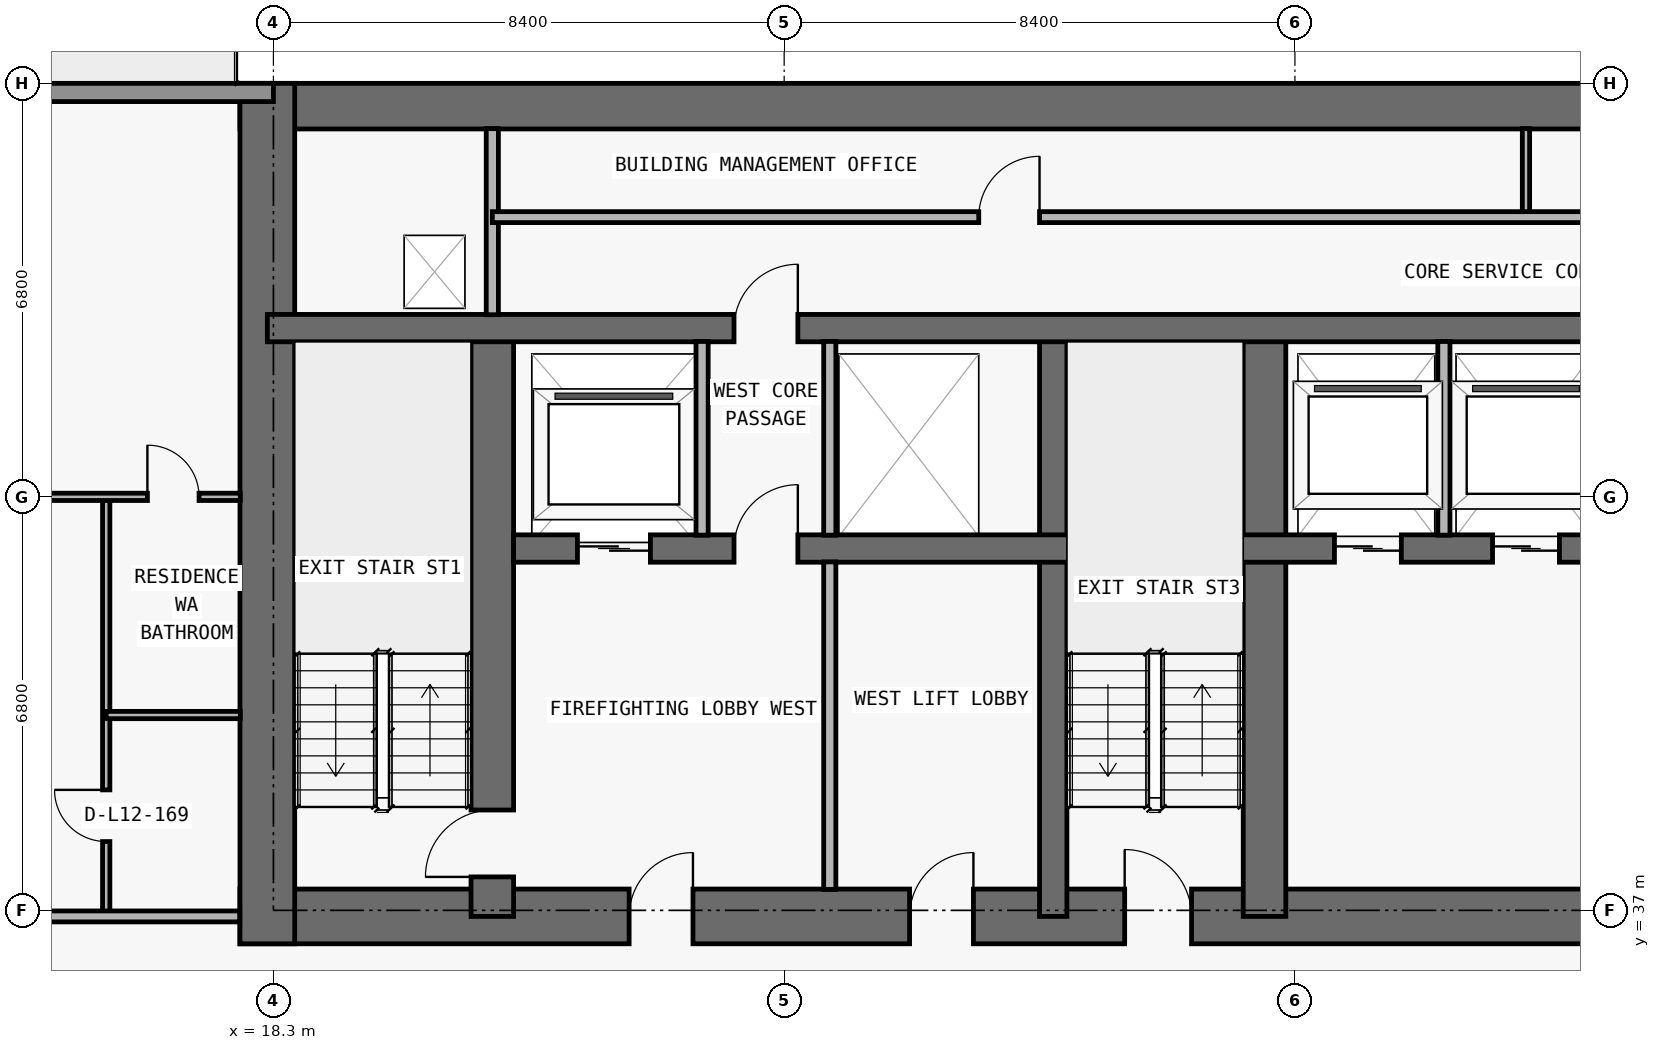
"""IFC4 building model, lengths in metres.
Left out: names, types, materials, properties, quantities, classifications, styles, units other than length and angle.
Written with IfcOpenShell. Run it as: python <this file> out.ifc"""

import sys

from ifc_helpers import new_model, si_unit, direction, frame, frame_2d, origin, place, context, subcontext, project, spatial, rectangle, extrude, element, fill, save


model = new_model("IFC4")
c1 = context("Model", 3, precision=1e-05, world=origin(), true_north=direction((0.0, 1.0)))
c2 = subcontext(c1, "Body", "Model", "MODEL_VIEW")
j1 = project(units=[si_unit("LENGTHUNIT", "METRE"), si_unit("PLANEANGLEUNIT", "RADIAN")], contexts=[c1])
p1 = place(None, origin())
s1 = spatial("IfcSite", under=j1, at=p1, CompositionType="ELEMENT")
p2 = place(p1, origin())
s2 = spatial("IfcBuilding", under=s1, at=p2, CompositionType="ELEMENT")
p3 = place(p2, frame((0.0, 0.0, 49.8)))
s3 = spatial("IfcBuildingStorey", under=s2, at=p3, CompositionType="ELEMENT", Elevation=49.8)
p4 = place(p3, frame((17.75, 36.9, 0.0), z_axis=(0.0, 0.0, 1.0), x_axis=(1.0, 0.0, 0.0)))
e1 = element("IfcWall", 1, at=p4, inside=s3, PredefinedType="SHEAR", context=c2, shape_type="SweptSolid", body=[
    extrude(rectangle(XDim=42.3, YDim=0.9, at=frame_2d((21.15, 0.0))), origin(), (0.0, 0.0, 1.0), 3.05),
])
p5 = place(p4, frame((14.55, 0.0, 0.0)))
e2 = element("IfcOpeningElement", 2, at=p5, cuts=e1, PredefinedType="OPENING", context=c2, shape_type="SweptSolid", body=[
    extrude(rectangle(XDim=1.1, YDim=2.15, at=frame_2d((0.55, 1.075))), frame((0.0, 0.46, 0.0), z_axis=(0.0, -1.0, 0.0), x_axis=(1.0, 0.0, 0.0)), (0.0, 0.0, 1.0), 0.92),
])
p6 = place(p4, frame((6.4, 0.0, 0.0)))
e3 = element("IfcOpeningElement", 3, at=p6, cuts=e1, PredefinedType="OPENING", context=c2, shape_type="SweptSolid", body=[
    extrude(rectangle(XDim=1.05, YDim=2.15, at=frame_2d((0.525, 1.075))), frame((0.0, 0.46, 0.0), z_axis=(0.0, -1.0, 0.0), x_axis=(1.0, 0.0, 0.0)), (0.0, 0.0, 1.0), 0.92),
])
p7 = place(p4, frame((34.9, 0.0, 0.0)))
e4 = element("IfcOpeningElement", 4, at=p7, cuts=e1, PredefinedType="OPENING", context=c2, shape_type="SweptSolid", body=[
    extrude(rectangle(XDim=1.05, YDim=2.15, at=frame_2d((0.525, 1.075))), frame((0.0, 0.46, 0.0), z_axis=(0.0, -1.0, 0.0), x_axis=(1.0, 0.0, 0.0)), (0.0, 0.0, 1.0), 0.92),
])
p8 = place(p4, frame((11.012, 0.0, 0.0)))
e5 = element("IfcOpeningElement", 5, at=p8, cuts=e1, PredefinedType="OPENING", context=c2, shape_type="SweptSolid", body=[
    extrude(rectangle(XDim=1.05, YDim=2.15, at=frame_2d((0.525, 1.075))), frame((0.0, 0.46, 0.0), z_axis=(0.0, -1.0, 0.0), x_axis=(1.0, 0.0, 0.0)), (0.0, 0.0, 1.0), 0.92),
])
p9 = place(p4, frame((24.25, 0.0, 0.0)))
e6 = element("IfcOpeningElement", 6, at=p9, cuts=e1, PredefinedType="OPENING", context=c2, shape_type="SweptSolid", body=[
    extrude(rectangle(XDim=1.05, YDim=2.15, at=frame_2d((0.525, 1.075))), frame((0.0, 0.46, 0.0), z_axis=(0.0, -1.0, 0.0), x_axis=(1.0, 0.0, 0.0)), (0.0, 0.0, 1.0), 0.92),
])
p10 = place(p3, frame((17.75, 50.225, 0.0), z_axis=(0.0, 0.0, 1.0), x_axis=(1.0, 0.0, 0.0)))
e7 = element("IfcWall", 7, at=p10, inside=s3, PredefinedType="SHEAR", context=c2, shape_type="SweptSolid", body=[
    extrude(rectangle(XDim=42.3, YDim=0.75, at=frame_2d((21.15, 0.0))), origin(), (0.0, 0.0, 1.0), 3.05),
])
p11 = place(p3, frame((18.2, 36.45, 0.0), z_axis=(0.0, 0.0, 1.0), x_axis=(0.0, 1.0, 0.0)))
e8 = element("IfcWall", 8, at=p11, inside=s3, PredefinedType="SHEAR", context=c2, shape_type="SweptSolid", body=[
    extrude(rectangle(XDim=14.15, YDim=0.9, at=frame_2d((7.075, 0.0))), origin(), (0.0, 0.0, 1.0), 3.05),
])
p12 = place(p3, frame((21.9, 36.9, 0.0), z_axis=(0.0, 0.0, 1.0), x_axis=(0.0, 1.0, 0.0)))
e9 = element("IfcWall", 9, at=p12, inside=s3, PredefinedType="SHEAR", context=c2, shape_type="SweptSolid", body=[
    extrude(rectangle(XDim=9.675, YDim=0.7, at=frame_2d((4.837, 0.0))), origin(), (0.0, 0.0, 1.0), 3.05),
])
p13 = place(p12, frame((0.65, 0.0, 0.0)))
e10 = element("IfcOpeningElement", 10, at=p13, cuts=e9, PredefinedType="OPENING", context=c2, shape_type="SweptSolid", body=[
    extrude(rectangle(XDim=1.1, YDim=2.15, at=frame_2d((0.55, 1.075))), frame((0.0, 0.36, 0.0), z_axis=(0.0, -1.0, 0.0), x_axis=(1.0, 0.0, 0.0)), (0.0, 0.0, 1.0), 0.72),
])
p14 = place(p3, frame((31.125, 36.9, 0.0), z_axis=(0.0, 0.0, 1.0), x_axis=(0.0, 1.0, 0.0)))
e11 = element("IfcWall", 11, at=p14, inside=s3, PredefinedType="SHEAR", context=c2, shape_type="SweptSolid", body=[
    extrude(rectangle(XDim=9.675, YDim=0.45, at=frame_2d((4.837, 0.0))), origin(), (0.0, 0.0, 1.0), 3.05),
])
p15 = place(p3, frame((34.6, 36.9, 0.0), z_axis=(0.0, 0.0, 1.0), x_axis=(0.0, 1.0, 0.0)))
e12 = element("IfcWall", 12, at=p15, inside=s3, PredefinedType="SHEAR", context=c2, shape_type="SweptSolid", body=[
    extrude(rectangle(XDim=9.675, YDim=0.7, at=frame_2d((4.837, 0.0))), origin(), (0.0, 0.0, 1.0), 3.05),
])
p16 = place(p3, frame((22.25, 42.95, 0.0), z_axis=(0.0, 0.0, 1.0), x_axis=(1.0, 0.0, 0.0)))
e13 = element("IfcWall", 13, at=p16, inside=s3, PredefinedType="SHEAR", context=c2, shape_type="SweptSolid", body=[
    extrude(rectangle(XDim=33.3, YDim=0.45, at=frame_2d((16.65, 0.0))), origin(), (0.0, 0.0, 1.0), 3.05),
])
p17 = place(p16, frame((1.05, 0.0, 0.0)))
e14 = element("IfcOpeningElement", 14, at=p17, cuts=e13, PredefinedType="OPENING", context=c2, shape_type="SweptSolid", body=[
    extrude(rectangle(XDim=1.2, YDim=2.2, at=frame_2d((0.6, 1.1))), frame((0.0, 0.235, 0.0), z_axis=(0.0, -1.0, 0.0), x_axis=(1.0, 0.0, 0.0)), (0.0, 0.0, 1.0), 0.47),
])
p18 = place(p16, frame((31.05, 0.0, 0.0)))
e15 = element("IfcOpeningElement", 15, at=p18, cuts=e13, PredefinedType="OPENING", context=c2, shape_type="SweptSolid", body=[
    extrude(rectangle(XDim=1.2, YDim=2.2, at=frame_2d((0.6, 1.1))), frame((0.0, 0.235, 0.0), z_axis=(0.0, -1.0, 0.0), x_axis=(1.0, 0.0, 0.0)), (0.0, 0.0, 1.0), 0.47),
])
p19 = place(p16, frame((13.5, 0.0, 0.0)))
e16 = element("IfcOpeningElement", 16, at=p19, cuts=e13, PredefinedType="OPENING", context=c2, shape_type="SweptSolid", body=[
    extrude(rectangle(XDim=1.1, YDim=2.2, at=frame_2d((0.55, 1.1))), frame((0.0, 0.235, 0.0), z_axis=(0.0, -1.0, 0.0), x_axis=(1.0, 0.0, 0.0)), (0.0, 0.0, 1.0), 0.47),
])
p20 = place(p16, frame((16.1, 0.0, 0.0)))
e17 = element("IfcOpeningElement", 17, at=p20, cuts=e13, PredefinedType="OPENING", context=c2, shape_type="SweptSolid", body=[
    extrude(rectangle(XDim=1.1, YDim=2.2, at=frame_2d((0.55, 1.1))), frame((0.0, 0.235, 0.0), z_axis=(0.0, -1.0, 0.0), x_axis=(1.0, 0.0, 0.0)), (0.0, 0.0, 1.0), 0.47),
])
p21 = place(p16, frame((18.7, 0.0, 0.0)))
e18 = element("IfcOpeningElement", 18, at=p21, cuts=e13, PredefinedType="OPENING", context=c2, shape_type="SweptSolid", body=[
    extrude(rectangle(XDim=1.1, YDim=2.2, at=frame_2d((0.55, 1.1))), frame((0.0, 0.235, 0.0), z_axis=(0.0, -1.0, 0.0), x_axis=(1.0, 0.0, 0.0)), (0.0, 0.0, 1.0), 0.47),
])
p22 = place(p16, frame((3.625, 0.0, 0.0)))
e19 = element("IfcOpeningElement", 19, at=p22, cuts=e13, PredefinedType="OPENING", context=c2, shape_type="SweptSolid", body=[
    extrude(rectangle(XDim=1.05, YDim=2.15, at=frame_2d((0.525, 1.075))), frame((0.0, 0.235, 0.0), z_axis=(0.0, -1.0, 0.0), x_axis=(1.0, 0.0, 0.0)), (0.0, 0.0, 1.0), 0.47),
])
p23 = place(p16, frame((28.675, 0.0, 0.0)))
e20 = element("IfcOpeningElement", 20, at=p23, cuts=e13, PredefinedType="OPENING", context=c2, shape_type="SweptSolid", body=[
    extrude(rectangle(XDim=1.05, YDim=2.15, at=frame_2d((0.525, 1.075))), frame((0.0, 0.235, 0.0), z_axis=(0.0, -1.0, 0.0), x_axis=(1.0, 0.0, 0.0)), (0.0, 0.0, 1.0), 0.47),
])
p24 = place(p3, frame((18.2, 46.575, 0.0), z_axis=(0.0, 0.0, 1.0), x_axis=(1.0, 0.0, 0.0)))
e21 = element("IfcWall", 21, at=p24, inside=s3, PredefinedType="SHEAR", context=c2, shape_type="SweptSolid", body=[
    extrude(rectangle(XDim=41.4, YDim=0.45, at=frame_2d((20.7, 0.0))), origin(), (0.0, 0.0, 1.0), 3.05),
])
p25 = place(p24, frame((7.675, 0.0, 0.0)))
e22 = element("IfcOpeningElement", 22, at=p25, cuts=e21, PredefinedType="OPENING", context=c2, shape_type="SweptSolid", body=[
    extrude(rectangle(XDim=1.05, YDim=2.15, at=frame_2d((0.525, 1.075))), frame((0.0, 0.235, 0.0), z_axis=(0.0, -1.0, 0.0), x_axis=(1.0, 0.0, 0.0)), (0.0, 0.0, 1.0), 0.47),
])
p26 = place(p24, frame((32.725, 0.0, 0.0)))
e23 = element("IfcOpeningElement", 23, at=p26, cuts=e21, PredefinedType="OPENING", context=c2, shape_type="SweptSolid", body=[
    extrude(rectangle(XDim=1.05, YDim=2.15, at=frame_2d((0.525, 1.075))), frame((0.0, 0.235, 0.0), z_axis=(0.0, -1.0, 0.0), x_axis=(1.0, 0.0, 0.0)), (0.0, 0.0, 1.0), 0.47),
])
p27 = place(p3, frame((5.1, 50.45, 0.0), z_axis=(0.0, 0.0, 1.0), x_axis=(1.0, 0.0, 0.0)))
e24 = element("IfcWall", 24, at=p27, inside=s3, PredefinedType="STANDARD", context=c2, shape_type="SweptSolid", body=[
    extrude(rectangle(XDim=13.2, YDim=0.3, at=frame_2d((6.6, 0.0))), origin(), (0.0, 0.0, 1.0), 3.05),
])
p28 = place(p27, frame((5.6, 0.0, 0.0)))
e25 = element("IfcOpeningElement", 25, at=p28, cuts=e24, PredefinedType="OPENING", context=c2, shape_type="SweptSolid", body=[
    extrude(rectangle(XDim=2.0, YDim=2.3, at=frame_2d((1.0, 1.15))), frame((0.0, 0.16, 0.0), z_axis=(0.0, -1.0, 0.0), x_axis=(1.0, 0.0, 0.0)), (0.0, 0.0, 1.0), 0.32),
])
p29 = place(p3, frame((15.55, 36.9, 0.0), z_axis=(0.0, 0.0, 1.0), x_axis=(0.0, 1.0, 0.0)))
e26 = element("IfcWall", 26, at=p29, inside=s3, PredefinedType="PARTITIONING", context=c2, shape_type="SweptSolid", body=[
    extrude(rectangle(XDim=6.9, YDim=0.12, at=frame_2d((3.45, 0.0))), origin(), (0.0, 0.0, 1.0), 2.499),
])
p30 = place(p29, frame((1.231, 0.0, 0.0)))
e27 = element("IfcOpeningElement", 27, at=p30, cuts=e26, PredefinedType="OPENING", context=c2, shape_type="SweptSolid", body=[
    extrude(rectangle(XDim=0.85, YDim=2.1, at=frame_2d((0.425, 1.05))), frame((0.0, 0.07, 0.0), z_axis=(0.0, -1.0, 0.0), x_axis=(1.0, 0.0, 0.0)), (0.0, 0.0, 1.0), 0.14),
])
p31 = place(p3, frame((21.9, 46.795, 0.0), z_axis=(0.0, 0.0, 1.0), x_axis=(0.0, 1.0, 0.0)))
e28 = element("IfcWall", 28, at=p31, inside=s3, PredefinedType="PARTITIONING", context=c2, shape_type="SweptSolid", body=[
    extrude(rectangle(XDim=3.06, YDim=0.2, at=frame_2d((1.53, 0.0))), origin(), (0.0, 0.0, 1.0), 3.05),
])
p32 = place(p3, frame((25.35, 43.17, 0.0), z_axis=(0.0, 0.0, 1.0), x_axis=(0.0, 1.0, 0.0)))
e29 = element("IfcWall", 29, at=p32, inside=s3, PredefinedType="PARTITIONING", context=c2, shape_type="SweptSolid", body=[
    extrude(rectangle(XDim=3.185, YDim=0.2, at=frame_2d((1.593, 0.0))), origin(), (0.0, 0.0, 1.0), 3.05),
])
p33 = place(p3, frame((27.45, 37.345, 0.0), z_axis=(0.0, 0.0, 1.0), x_axis=(0.0, 1.0, 0.0)))
e30 = element("IfcWall", 30, at=p33, inside=s3, PredefinedType="PARTITIONING", context=c2, shape_type="SweptSolid", body=[
    extrude(rectangle(XDim=5.385, YDim=0.2, at=frame_2d((2.692, 0.0))), origin(), (0.0, 0.0, 1.0), 3.05),
])
for number, where, z_axis, x_axis in (
    (31, (27.45, 43.17, 0.0), (0.0, 0.0, 1.0), (0.0, 1.0, 0.0)),
    (32, (37.55, 43.17, 0.0), (0.0, 0.0, 1.0), (0.0, 1.0, 0.0)),
):
    element("IfcWall", number, at=place(p3, frame(where, z_axis=z_axis, x_axis=x_axis)), inside=s3, PredefinedType="PARTITIONING", context=c2, shape_type="SweptSolid", body=[
        extrude(rectangle(XDim=3.185, YDim=0.2, at=frame_2d((1.593, 0.0))), origin(), (0.0, 0.0, 1.0), 3.05),
    ])
p34 = place(p3, frame((38.9, 48.4, 0.0), z_axis=(0.0, 0.0, 1.0), x_axis=(0.0, 1.0, 0.0)))
e33 = element("IfcWall", 33, at=p34, inside=s3, PredefinedType="PARTITIONING", context=c2, shape_type="SweptSolid", body=[
    extrude(rectangle(XDim=1.455, YDim=0.12, at=frame_2d((0.728, 0.0))), origin(), (0.0, 0.0, 1.0), 3.05),
])
p35 = place(p3, frame((5.1, 36.9, 0.0), z_axis=(0.0, 0.0, 1.0), x_axis=(1.0, 0.0, 0.0)))
e34 = element("IfcWall", 34, at=p35, inside=s3, PredefinedType="PARTITIONING", context=c2, shape_type="SweptSolid", body=[
    extrude(rectangle(XDim=12.645, YDim=0.18, at=frame_2d((6.323, 0.0))), origin(), (0.0, 0.0, 1.0), 3.05),
])
p36 = place(p35, frame((7.125, 0.0, 0.0)))
e35 = element("IfcOpeningElement", 35, at=p36, cuts=e34, PredefinedType="OPENING", context=c2, shape_type="SweptSolid", body=[
    extrude(rectangle(XDim=1.0, YDim=2.2, at=frame_2d((0.5, 1.1))), frame((0.0, 0.1, 0.0), z_axis=(0.0, -1.0, 0.0), x_axis=(1.0, 0.0, 0.0)), (0.0, 0.0, 1.0), 0.2),
])
p37 = place(p3, frame((15.55, 40.212, 0.0), z_axis=(0.0, 0.0, 1.0), x_axis=(1.0, 0.0, 0.0)))
e36 = element("IfcWall", 36, at=p37, inside=s3, PredefinedType="PARTITIONING", context=c2, shape_type="SweptSolid", body=[
    extrude(rectangle(XDim=2.205, YDim=0.12, at=frame_2d((1.103, 0.0))), origin(), (0.0, 0.0, 1.0), 3.05),
])
p38 = place(p3, frame((1.795, 43.8, 0.0), z_axis=(0.0, 0.0, 1.0), x_axis=(1.0, 0.0, 0.0)))
e37 = element("IfcWall", 37, at=p38, inside=s3, PredefinedType="PARTITIONING", context=c2, shape_type="SweptSolid", body=[
    extrude(rectangle(XDim=15.96, YDim=0.12, at=frame_2d((7.98, 0.0))), origin(), (0.0, 0.0, 1.0), 2.339),
])
p39 = place(p38, frame((5.255, 0.0, 0.0)))
e38 = element("IfcOpeningElement", 38, at=p39, cuts=e37, PredefinedType="OPENING", context=c2, shape_type="SweptSolid", body=[
    extrude(rectangle(XDim=0.9, YDim=2.15, at=frame_2d((0.45, 1.075))), frame((0.0, 0.07, 0.0), z_axis=(0.0, -1.0, 0.0), x_axis=(1.0, 0.0, 0.0)), (0.0, 0.0, 1.0), 0.14),
])
p40 = place(p38, frame((10.48, 0.0, 0.0)))
e39 = element("IfcOpeningElement", 39, at=p40, cuts=e37, PredefinedType="OPENING", context=c2, shape_type="SweptSolid", body=[
    extrude(rectangle(XDim=0.9, YDim=2.15, at=frame_2d((0.45, 1.075))), frame((0.0, 0.07, 0.0), z_axis=(0.0, -1.0, 0.0), x_axis=(1.0, 0.0, 0.0)), (0.0, 0.0, 1.0), 0.14),
])
p41 = place(p38, frame((14.433, 0.0, 0.0)))
e40 = element("IfcOpeningElement", 40, at=p41, cuts=e37, PredefinedType="OPENING", context=c2, shape_type="SweptSolid", body=[
    extrude(rectangle(XDim=0.85, YDim=2.1, at=frame_2d((0.425, 1.05))), frame((0.0, 0.07, 0.0), z_axis=(0.0, -1.0, 0.0), x_axis=(1.0, 0.0, 0.0)), (0.0, 0.0, 1.0), 0.14),
])
p42 = place(p3, frame((21.9, 48.4, 0.0), z_axis=(0.0, 0.0, 1.0), x_axis=(1.0, 0.0, 0.0)))
e41 = element("IfcWall", 41, at=p42, inside=s3, PredefinedType="PARTITIONING", context=c2, shape_type="SweptSolid", body=[
    extrude(rectangle(XDim=34.0, YDim=0.18, at=frame_2d((17.0, 0.0))), origin(), (0.0, 0.0, 1.0), 3.05),
])
p43 = place(p42, frame((8.0, 0.0, 0.0)))
e42 = element("IfcOpeningElement", 42, at=p43, cuts=e41, PredefinedType="OPENING", context=c2, shape_type="SweptSolid", body=[
    extrude(rectangle(XDim=1.0, YDim=2.2, at=frame_2d((0.5, 1.1))), frame((0.0, 0.1, 0.0), z_axis=(0.0, -1.0, 0.0), x_axis=(1.0, 0.0, 0.0)), (0.0, 0.0, 1.0), 0.2),
])
p44 = place(p42, frame((25.0, 0.0, 0.0)))
e43 = element("IfcOpeningElement", 43, at=p44, cuts=e41, PredefinedType="OPENING", context=c2, shape_type="SweptSolid", body=[
    extrude(rectangle(XDim=1.0, YDim=2.2, at=frame_2d((0.5, 1.1))), frame((0.0, 0.1, 0.0), z_axis=(0.0, -1.0, 0.0), x_axis=(1.0, 0.0, 0.0)), (0.0, 0.0, 1.0), 0.2),
])
p45 = place(p17, origin())
e44 = element("IfcDoor", 44, at=p45, inside=s3, OperationType="DOUBLE_DOOR_SLIDING", PredefinedType="DOOR", context=c2, shape_type="SweptSolid", body=[
    extrude(rectangle(XDim=1.2, YDim=2.2, at=frame_2d((0.6, 1.1))), frame((0.0, 0.025, 0.0), z_axis=(0.0, -1.0, 0.0), x_axis=(1.0, 0.0, 0.0)), (0.0, 0.0, 1.0), 0.05),
])
fill(e14, e44)
p46 = place(p19, origin())
e45 = element("IfcDoor", 45, at=p46, inside=s3, OperationType="DOUBLE_DOOR_SLIDING", PredefinedType="DOOR", context=c2, shape_type="SweptSolid", body=[
    extrude(rectangle(XDim=1.1, YDim=2.2, at=frame_2d((0.55, 1.1))), frame((0.0, 0.025, 0.0), z_axis=(0.0, -1.0, 0.0), x_axis=(1.0, 0.0, 0.0)), (0.0, 0.0, 1.0), 0.05),
])
fill(e16, e45)
p47 = place(p20, origin())
e46 = element("IfcDoor", 46, at=p47, inside=s3, OperationType="DOUBLE_DOOR_SLIDING", PredefinedType="DOOR", context=c2, shape_type="SweptSolid", body=[
    extrude(rectangle(XDim=1.1, YDim=2.2, at=frame_2d((0.55, 1.1))), frame((0.0, 0.025, 0.0), z_axis=(0.0, -1.0, 0.0), x_axis=(1.0, 0.0, 0.0)), (0.0, 0.0, 1.0), 0.05),
])
fill(e17, e46)
p48 = place(p5, origin())
e47 = element("IfcDoor", 47, at=p48, inside=s3, OperationType="SINGLE_SWING_LEFT", PredefinedType="DOOR", context=c2, shape_type="SweptSolid", body=[
    extrude(rectangle(XDim=1.1, YDim=2.15, at=frame_2d((0.55, 1.075))), frame((0.0, 0.025, 0.0), z_axis=(0.0, -1.0, 0.0), x_axis=(1.0, 0.0, 0.0)), (0.0, 0.0, 1.0), 0.05),
])
fill(e2, e47)
p49 = place(p6, origin())
e48 = element("IfcDoor", 48, at=p49, inside=s3, OperationType="SINGLE_SWING_RIGHT", PredefinedType="DOOR", context=c2, shape_type="SweptSolid", body=[
    extrude(rectangle(XDim=1.05, YDim=2.15, at=frame_2d((0.525, 1.075))), frame((0.0, 0.025, 0.0), z_axis=(0.0, -1.0, 0.0), x_axis=(1.0, 0.0, 0.0)), (0.0, 0.0, 1.0), 0.05),
])
fill(e3, e48)
p50 = place(p13, origin())
e49 = element("IfcDoor", 49, at=p50, inside=s3, OperationType="SINGLE_SWING_LEFT", PredefinedType="DOOR", context=c2, shape_type="SweptSolid", body=[
    extrude(rectangle(XDim=1.1, YDim=2.15, at=frame_2d((0.55, 1.075))), frame((0.0, 0.025, 0.0), z_axis=(0.0, -1.0, 0.0), x_axis=(1.0, 0.0, 0.0)), (0.0, 0.0, 1.0), 0.05),
])
fill(e10, e49)
p51 = place(p22, origin())
e50 = element("IfcDoor", 50, at=p51, inside=s3, OperationType="SINGLE_SWING_RIGHT", PredefinedType="DOOR", context=c2, shape_type="SweptSolid", body=[
    extrude(rectangle(XDim=1.05, YDim=2.15, at=frame_2d((0.525, 1.075))), frame((0.0, 0.025, 0.0), z_axis=(0.0, -1.0, 0.0), x_axis=(1.0, 0.0, 0.0)), (0.0, 0.0, 1.0), 0.05),
])
fill(e19, e50)
p52 = place(p8, origin())
e51 = element("IfcDoor", 51, at=p52, inside=s3, OperationType="SINGLE_SWING_RIGHT", PredefinedType="DOOR", context=c2, shape_type="SweptSolid", body=[
    extrude(rectangle(XDim=1.05, YDim=2.15, at=frame_2d((0.525, 1.075))), frame((0.0, 0.025, 0.0), z_axis=(0.0, -1.0, 0.0), x_axis=(1.0, 0.0, 0.0)), (0.0, 0.0, 1.0), 0.05),
])
fill(e5, e51)
p53 = place(p25, origin())
e52 = element("IfcDoor", 52, at=p53, inside=s3, OperationType="SINGLE_SWING_RIGHT", PredefinedType="DOOR", context=c2, shape_type="SweptSolid", body=[
    extrude(rectangle(XDim=1.05, YDim=2.15, at=frame_2d((0.525, 1.075))), frame((0.0, 0.025, 0.0), z_axis=(0.0, -1.0, 0.0), x_axis=(1.0, 0.0, 0.0)), (0.0, 0.0, 1.0), 0.05),
])
fill(e22, e52)
p54 = place(p43, origin())
e53 = element("IfcDoor", 53, at=p54, inside=s3, OperationType="SINGLE_SWING_RIGHT", PredefinedType="DOOR", context=c2, shape_type="SweptSolid", body=[
    extrude(rectangle(XDim=1.0, YDim=2.2, at=frame_2d((0.5, 1.1))), frame((0.0, 0.025, 0.0), z_axis=(0.0, -1.0, 0.0), x_axis=(1.0, 0.0, 0.0)), (0.0, 0.0, 1.0), 0.05),
])
fill(e42, e53)
p55 = place(p30, origin())
e54 = element("IfcDoor", 54, at=p55, inside=s3, OperationType="SINGLE_SWING_RIGHT", PredefinedType="DOOR", context=c2, shape_type="SweptSolid", body=[
    extrude(rectangle(XDim=0.85, YDim=2.1, at=frame_2d((0.425, 1.05))), frame((0.0, 0.025, 0.0), z_axis=(0.0, -1.0, 0.0), x_axis=(1.0, 0.0, 0.0)), (0.0, 0.0, 1.0), 0.05),
])
fill(e27, e54)
p56 = place(p41, origin())
e55 = element("IfcDoor", 55, at=p56, inside=s3, OperationType="SINGLE_SWING_LEFT", PredefinedType="DOOR", context=c2, shape_type="SweptSolid", body=[
    extrude(rectangle(XDim=0.85, YDim=2.1, at=frame_2d((0.425, 1.05))), frame((0.0, 0.025, 0.0), z_axis=(0.0, -1.0, 0.0), x_axis=(1.0, 0.0, 0.0)), (0.0, 0.0, 1.0), 0.05),
])
fill(e40, e55)
save(model, sys.argv[1])
